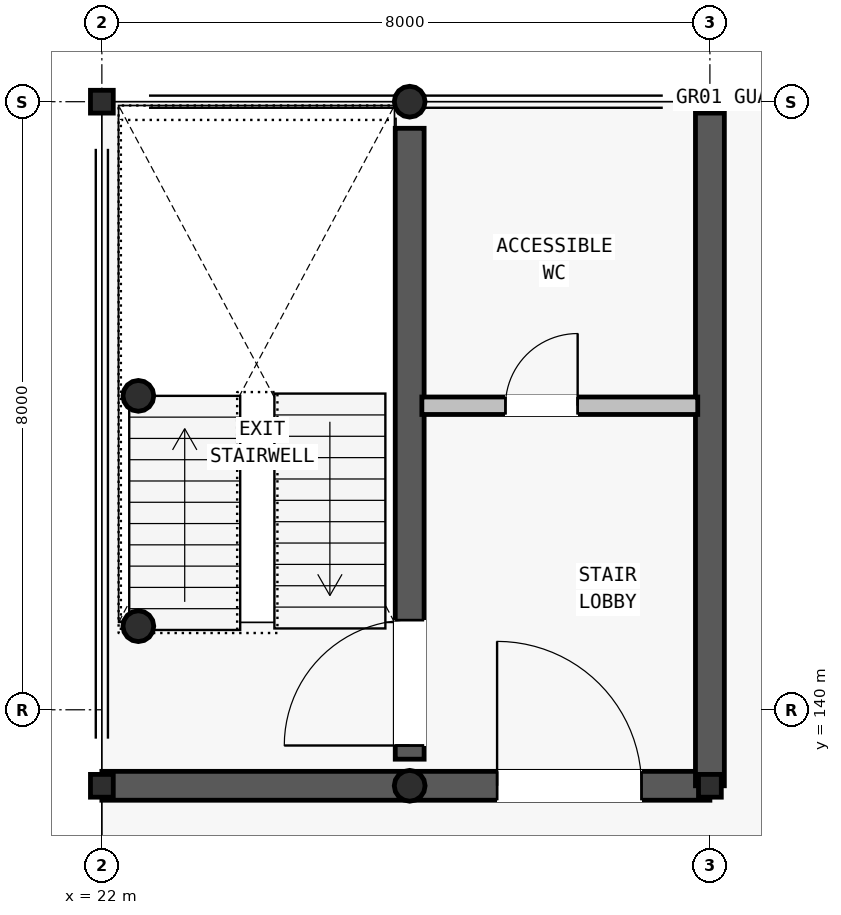
"""IFC4 building model, lengths in metres.
Left out: names, types, materials, properties, quantities, classifications, styles, units other than length and angle.
Written with IfcOpenShell. Run it as: python <this file> out.ifc"""

import sys

from ifc_helpers import new_model, si_unit, direction, frame, frame_2d, origin, origin_2d, place, context, subcontext, project, spatial, rectangle, hollow_circle, i_section, extrude, element, fill, save


model = new_model("IFC4")
c1 = context("Model", 3, precision=1e-05, world=origin(), true_north=direction((0.0, 1.0)))
c2 = subcontext(c1, "Body", "Model", "MODEL_VIEW")
j1 = project(units=[si_unit("LENGTHUNIT", "METRE"), si_unit("PLANEANGLEUNIT", "RADIAN")], contexts=[c1])
p1 = place(None, origin())
s1 = spatial("IfcSite", under=j1, at=p1, CompositionType="ELEMENT")
p2 = place(p1, origin())
s2 = spatial("IfcBuilding", under=s1, at=p2, CompositionType="ELEMENT")
p3 = place(p2, frame((0.0, 0.0, 17.3)))
s3 = spatial("IfcBuildingStorey", under=s2, at=p3, CompositionType="ELEMENT", Elevation=17.3)
for number, where, z_axis, x_axis in (
    (1, (22.0, 148.0, 0.0), (0.0, 0.0, 1.0), (1.0, 0.0, 0.0)),
    (2, (30.0, 148.0, 0.0), (0.0, 0.0, 1.0), (1.0, 0.0, 0.0)),
    (3, (22.0, 139.0, 0.0), (0.0, 0.0, 1.0), (1.0, 0.0, 0.0)),
    (4, (30.0, 139.0, 0.0), (0.0, 0.0, 1.0), (1.0, 0.0, 0.0)),
):
    element("IfcColumn", number, at=place(p3, frame(where, z_axis=z_axis, x_axis=x_axis)), inside=s3, PredefinedType="COLUMN", context=c2, shape_type="SweptSolid", body=[
        extrude(i_section(OverallWidth=0.3, OverallDepth=0.3, WebThickness=0.01, FlangeThickness=0.015, FilletRadius=0.018, at=origin_2d()), origin(), (0.0, 0.0, 1.0), 3.9),
    ])
for number, where, z_axis, x_axis in (
    (5, (26.05, 139.0, 0.0), (0.0, 0.0, 1.0), (1.0, 0.0, 0.0)),
    (6, (26.05, 148.0, 0.0), (0.0, 0.0, 1.0), (1.0, 0.0, 0.0)),
    (7, (22.48, 141.1, 0.0), (0.0, 0.0, 1.0), (1.0, 0.0, 0.0)),
    (8, (22.48, 144.13, 0.0), (0.0, 0.0, 1.0), (1.0, 0.0, 0.0)),
):
    element("IfcColumn", number, at=place(p3, frame(where, z_axis=z_axis, x_axis=x_axis)), inside=s3, PredefinedType="COLUMN", context=c2, shape_type="SweptSolid", body=[
        extrude(hollow_circle(Radius=0.203, WallThickness=0.014, at=origin_2d()), origin(), (0.0, 0.0, 1.0), 3.9),
    ])
p4 = place(p3, frame((22.0, 139.0, 0.0), z_axis=(0.0, 0.0, 1.0), x_axis=(1.0, 0.0, 0.0)))
e9 = element("IfcWall", 9, at=p4, inside=s3, PredefinedType="SHEAR", context=c2, shape_type="SweptSolid", body=[
    extrude(rectangle(XDim=8.0, YDim=0.38, at=frame_2d((4.0, 0.0))), origin(), (0.0, 0.0, 1.0), 3.62),
])
p5 = place(p4, frame((5.2, 0.0, 0.0)))
e10 = element("IfcOpeningElement", 10, at=p5, cuts=e9, PredefinedType="OPENING", context=c2, shape_type="SweptSolid", body=[
    extrude(rectangle(XDim=1.9, YDim=2.3, at=frame_2d((0.95, 1.15))), frame((0.0, 0.2, 0.0), z_axis=(0.0, -1.0, 0.0), x_axis=(1.0, 0.0, 0.0)), (0.0, 0.0, 1.0), 0.4),
])
p6 = place(p3, frame((30.0, 139.0, 0.0), z_axis=(0.0, 0.0, 1.0), x_axis=(0.0, 1.0, 0.0)))
e11 = element("IfcWall", 11, at=p6, inside=s3, PredefinedType="SHEAR", context=c2, shape_type="SweptSolid", body=[
    extrude(rectangle(XDim=9.0, YDim=0.38, at=frame_2d((4.5, 0.0))), origin(), (0.0, 0.0, 1.0), 3.62),
])
p7 = place(p3, frame((26.05, 139.35, 0.0), z_axis=(0.0, 0.0, 1.0), x_axis=(0.0, 1.0, 0.0)))
e12 = element("IfcWall", 12, at=p7, inside=s3, PredefinedType="SHEAR", context=c2, shape_type="SweptSolid", body=[
    extrude(rectangle(XDim=8.3, YDim=0.38, at=frame_2d((4.15, 0.0))), origin(), (0.0, 0.0, 1.0), 3.62),
])
p8 = place(p7, frame((0.18, 0.0, 0.0)))
e13 = element("IfcOpeningElement", 13, at=p8, cuts=e12, PredefinedType="OPENING", context=c2, shape_type="SweptSolid", body=[
    extrude(rectangle(XDim=1.65, YDim=2.2, at=frame_2d((0.825, 1.1))), frame((0.0, 0.2, 0.0), z_axis=(0.0, -1.0, 0.0), x_axis=(1.0, 0.0, 0.0)), (0.0, 0.0, 1.0), 0.4),
])
p9 = place(p3, frame((26.21, 144.0, 0.0), z_axis=(0.0, 0.0, 1.0), x_axis=(1.0, 0.0, 0.0)))
e14 = element("IfcWall", 14, at=p9, inside=s3, PredefinedType="PARTITIONING", context=c2, shape_type="SweptSolid", body=[
    extrude(rectangle(XDim=3.63, YDim=0.23, at=frame_2d((1.815, 0.0))), origin(), (0.0, 0.0, 1.0), 2.48),
])
p10 = place(p9, frame((1.1, 0.0, 0.0)))
e15 = element("IfcOpeningElement", 15, at=p10, cuts=e14, PredefinedType="OPENING", context=c2, shape_type="SweptSolid", body=[
    extrude(rectangle(XDim=0.95, YDim=2.1, at=frame_2d((0.475, 1.05))), frame((0.0, 0.125, 0.0), z_axis=(0.0, -1.0, 0.0), x_axis=(1.0, 0.0, 0.0)), (0.0, 0.0, 1.0), 0.25),
])
p11 = place(p5, origin())
e16 = element("IfcDoor", 16, at=p11, inside=s3, OperationType="SINGLE_SWING_LEFT", PredefinedType="DOOR", context=c2, shape_type="SweptSolid", body=[
    extrude(rectangle(XDim=1.9, YDim=2.3, at=frame_2d((0.95, 1.15))), frame((0.0, 0.025, 0.0), z_axis=(0.0, -1.0, 0.0), x_axis=(1.0, 0.0, 0.0)), (0.0, 0.0, 1.0), 0.05),
])
fill(e10, e16)
p12 = place(p8, origin())
e17 = element("IfcDoor", 17, at=p12, inside=s3, OperationType="SINGLE_SWING_LEFT", PredefinedType="DOOR", context=c2, shape_type="SweptSolid", body=[
    extrude(rectangle(XDim=1.65, YDim=2.2, at=frame_2d((0.825, 1.1))), frame((0.0, 0.025, 0.0), z_axis=(0.0, -1.0, 0.0), x_axis=(1.0, 0.0, 0.0)), (0.0, 0.0, 1.0), 0.05),
])
fill(e13, e17)
p13 = place(p10, origin())
e18 = element("IfcDoor", 18, at=p13, inside=s3, OperationType="SINGLE_SWING_RIGHT", PredefinedType="DOOR", context=c2, shape_type="SweptSolid", body=[
    extrude(rectangle(XDim=0.95, YDim=2.1, at=frame_2d((0.475, 1.05))), frame((0.0, 0.025, 0.0), z_axis=(0.0, -1.0, 0.0), x_axis=(1.0, 0.0, 0.0)), (0.0, 0.0, 1.0), 0.05),
])
fill(e15, e18)
save(model, sys.argv[1])
